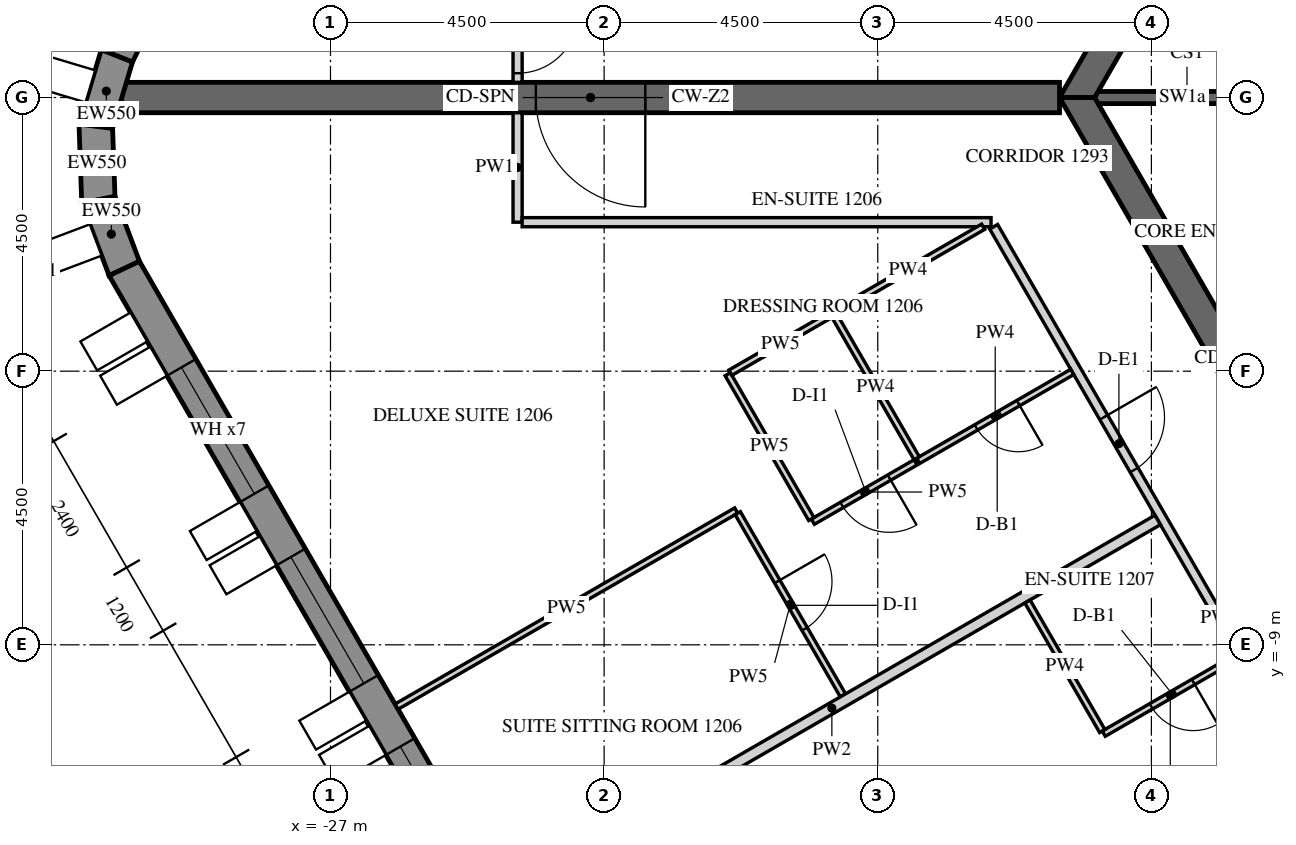
"""IFC4 building model, lengths in metres.
Left out: names, types, materials, properties, quantities, classifications, styles, units other than length and angle.
Written with IfcOpenShell. Run it as: python <this file> out.ifc"""

import sys

from ifc_helpers import new_model, si_unit, direction, frame, frame_2d, origin, place, context, subcontext, project, spatial, polyline, rectangle, outline, extrude, element, fill, save


model = new_model("IFC4")
c1 = context("Model", 3, precision=1e-05, world=origin(), true_north=direction((0.0, 1.0)))
c2 = subcontext(c1, "Body", "Model", "MODEL_VIEW")
j1 = project(units=[si_unit("LENGTHUNIT", "METRE"), si_unit("PLANEANGLEUNIT", "RADIAN")], contexts=[c1])
p1 = place(None, origin())
s1 = spatial("IfcSite", under=j1, at=p1, CompositionType="ELEMENT")
p2 = place(p1, origin())
s2 = spatial("IfcBuilding", under=s1, at=p2, CompositionType="ELEMENT")
p3 = place(p2, frame((0.0, 0.0, 164.4)))
s3 = spatial("IfcBuildingStorey", under=s2, at=p3, CompositionType="ELEMENT", Elevation=164.4)
p4 = place(p3, frame((-18.345, 25.633, -0.15), z_axis=(0.0, 0.0, 1.0), x_axis=(-0.43837181828, -0.898793718791, 0.0)))
e1 = element("IfcWall", 1, at=p4, inside=s3, PredefinedType="SOLIDWALL", context=c2, shape_type="SweptSolid", body=[
    extrude(outline(polyline([(-0.026, -0.275), (27.78, -0.275), (27.735, 0.275), (0.026, 0.275), (-0.026, -0.275)])), origin(), (0.0, 0.0, 1.0), 3.9),
])
p5 = place(p4, frame((1.879, 0.0, 1.05)))
e2 = element("IfcOpeningElement", 2, at=p5, cuts=e1, PredefinedType="OPENING", context=c2, shape_type="SweptSolid", body=[
    extrude(rectangle(XDim=2.4, YDim=2.4, at=frame_2d((1.2, 1.2))), frame((0.0, 0.285, 0.0), z_axis=(0.0, -1.0, 0.0), x_axis=(1.0, 0.0, 0.0)), (0.0, 0.0, 1.0), 0.57),
])
p6 = place(p4, frame((5.479, 0.0, 1.05)))
e3 = element("IfcOpeningElement", 3, at=p6, cuts=e1, PredefinedType="OPENING", context=c2, shape_type="SweptSolid", body=[
    extrude(rectangle(XDim=2.4, YDim=2.4, at=frame_2d((1.2, 1.2))), frame((0.0, 0.285, 0.0), z_axis=(0.0, -1.0, 0.0), x_axis=(1.0, 0.0, 0.0)), (0.0, 0.0, 1.0), 0.57),
])
p7 = place(p4, frame((9.079, 0.0, 1.05)))
e4 = element("IfcOpeningElement", 4, at=p7, cuts=e1, PredefinedType="OPENING", context=c2, shape_type="SweptSolid", body=[
    extrude(rectangle(XDim=2.4, YDim=2.4, at=frame_2d((1.2, 1.2))), frame((0.0, 0.285, 0.0), z_axis=(0.0, -1.0, 0.0), x_axis=(1.0, 0.0, 0.0)), (0.0, 0.0, 1.0), 0.57),
])
p8 = place(p4, frame((12.679, 0.0, 1.05)))
e5 = element("IfcOpeningElement", 5, at=p8, cuts=e1, PredefinedType="OPENING", context=c2, shape_type="SweptSolid", body=[
    extrude(rectangle(XDim=2.4, YDim=2.4, at=frame_2d((1.2, 1.2))), frame((0.0, 0.285, 0.0), z_axis=(0.0, -1.0, 0.0), x_axis=(1.0, 0.0, 0.0)), (0.0, 0.0, 1.0), 0.57),
])
p9 = place(p4, frame((16.279, 0.0, 1.05)))
e6 = element("IfcOpeningElement", 6, at=p9, cuts=e1, PredefinedType="OPENING", context=c2, shape_type="SweptSolid", body=[
    extrude(rectangle(XDim=2.4, YDim=2.4, at=frame_2d((1.2, 1.2))), frame((0.0, 0.285, 0.0), z_axis=(0.0, -1.0, 0.0), x_axis=(1.0, 0.0, 0.0)), (0.0, 0.0, 1.0), 0.57),
])
p10 = place(p4, frame((19.879, 0.0, 1.05)))
e7 = element("IfcOpeningElement", 7, at=p10, cuts=e1, PredefinedType="OPENING", context=c2, shape_type="SweptSolid", body=[
    extrude(rectangle(XDim=2.4, YDim=2.4, at=frame_2d((1.2, 1.2))), frame((0.0, 0.285, 0.0), z_axis=(0.0, -1.0, 0.0), x_axis=(1.0, 0.0, 0.0)), (0.0, 0.0, 1.0), 0.57),
])
p11 = place(p4, frame((23.479, 0.0, 1.05)))
e8 = element("IfcOpeningElement", 8, at=p11, cuts=e1, PredefinedType="OPENING", context=c2, shape_type="SweptSolid", body=[
    extrude(rectangle(XDim=2.4, YDim=2.4, at=frame_2d((1.2, 1.2))), frame((0.0, 0.285, 0.0), z_axis=(0.0, -1.0, 0.0), x_axis=(1.0, 0.0, 0.0)), (0.0, 0.0, 1.0), 0.57),
])
p12 = place(p3, frame((-30.513, 0.684, -0.15), z_axis=(0.0, 0.0, 1.0), x_axis=(-0.286736058109, -0.958009620505, 0.0)))
e9 = element("IfcWall", 9, at=p12, inside=s3, PredefinedType="SOLIDWALL", context=c2, shape_type="SweptSolid", body=[
    extrude(outline(polyline([(-0.022, -0.275), (1.253, -0.275), (1.163, 0.275), (0.022, 0.275), (-0.022, -0.275)])), origin(), (0.0, 0.0, 1.0), 3.9),
])
p13 = place(p3, frame((-30.86, -0.473, -0.15), z_axis=(0.0, 0.0, 1.0), x_axis=(0.03495638276, -0.999388838893, 0.0)))
e10 = element("IfcWall", 10, at=p13, inside=s3, PredefinedType="SOLIDWALL", context=c2, shape_type="SweptSolid", body=[
    extrude(outline(polyline([(-0.045, -0.275), (1.253, -0.275), (1.163, 0.275), (0.045, 0.275), (-0.045, -0.275)])), origin(), (0.0, 0.0, 1.0), 3.9),
])
p14 = place(p3, frame((-30.817, -1.681, -0.15), z_axis=(0.0, 0.0, 1.0), x_axis=(0.352850303963, -0.935679786569, 0.0)))
e11 = element("IfcWall", 11, at=p14, inside=s3, PredefinedType="SOLIDWALL", context=c2, shape_type="SweptSolid", body=[
    extrude(outline(polyline([(-0.045, -0.275), (1.23, -0.275), (1.186, 0.275), (0.045, 0.275), (-0.045, -0.275)])), origin(), (0.0, 0.0, 1.0), 3.9),
])
p15 = place(p3, frame((-30.391, -2.811, -0.15), z_axis=(0.0, 0.0, 1.0), x_axis=(0.499998569178, -0.866026229868, 0.0)))
e12 = element("IfcWall", 12, at=p15, inside=s3, PredefinedType="SOLIDWALL", context=c2, shape_type="SweptSolid", body=[
    extrude(outline(polyline([(-0.022, -0.275), (27.783, -0.275), (27.732, 0.275), (0.022, 0.275), (-0.022, -0.275)])), origin(), (0.0, 0.0, 1.0), 3.9),
])
p16 = place(p15, frame((1.879, 0.0, 1.05)))
e13 = element("IfcOpeningElement", 13, at=p16, cuts=e12, PredefinedType="OPENING", context=c2, shape_type="SweptSolid", body=[
    extrude(rectangle(XDim=2.4, YDim=2.4, at=frame_2d((1.2, 1.2))), frame((0.0, 0.285, 0.0), z_axis=(0.0, -1.0, 0.0), x_axis=(1.0, 0.0, 0.0)), (0.0, 0.0, 1.0), 0.57),
])
p17 = place(p15, frame((5.479, 0.0, 1.05)))
e14 = element("IfcOpeningElement", 14, at=p17, cuts=e12, PredefinedType="OPENING", context=c2, shape_type="SweptSolid", body=[
    extrude(rectangle(XDim=2.4, YDim=2.4, at=frame_2d((1.2, 1.2))), frame((0.0, 0.285, 0.0), z_axis=(0.0, -1.0, 0.0), x_axis=(1.0, 0.0, 0.0)), (0.0, 0.0, 1.0), 0.57),
])
p18 = place(p15, frame((9.079, 0.0, 1.05)))
e15 = element("IfcOpeningElement", 15, at=p18, cuts=e12, PredefinedType="OPENING", context=c2, shape_type="SweptSolid", body=[
    extrude(rectangle(XDim=2.4, YDim=2.4, at=frame_2d((1.2, 1.2))), frame((0.0, 0.285, 0.0), z_axis=(0.0, -1.0, 0.0), x_axis=(1.0, 0.0, 0.0)), (0.0, 0.0, 1.0), 0.57),
])
p19 = place(p15, frame((12.679, 0.0, 1.05)))
e16 = element("IfcOpeningElement", 16, at=p19, cuts=e12, PredefinedType="OPENING", context=c2, shape_type="SweptSolid", body=[
    extrude(rectangle(XDim=2.4, YDim=2.4, at=frame_2d((1.2, 1.2))), frame((0.0, 0.285, 0.0), z_axis=(0.0, -1.0, 0.0), x_axis=(1.0, 0.0, 0.0)), (0.0, 0.0, 1.0), 0.57),
])
p20 = place(p15, frame((16.279, 0.0, 1.05)))
e17 = element("IfcOpeningElement", 17, at=p20, cuts=e12, PredefinedType="OPENING", context=c2, shape_type="SweptSolid", body=[
    extrude(rectangle(XDim=2.4, YDim=2.4, at=frame_2d((1.2, 1.2))), frame((0.0, 0.285, 0.0), z_axis=(0.0, -1.0, 0.0), x_axis=(1.0, 0.0, 0.0)), (0.0, 0.0, 1.0), 0.57),
])
p21 = place(p15, frame((19.879, 0.0, 1.05)))
e18 = element("IfcOpeningElement", 18, at=p21, cuts=e12, PredefinedType="OPENING", context=c2, shape_type="SweptSolid", body=[
    extrude(rectangle(XDim=2.4, YDim=2.4, at=frame_2d((1.2, 1.2))), frame((0.0, 0.285, 0.0), z_axis=(0.0, -1.0, 0.0), x_axis=(1.0, 0.0, 0.0)), (0.0, 0.0, 1.0), 0.57),
])
p22 = place(p15, frame((23.479, 0.0, 1.05)))
e19 = element("IfcOpeningElement", 19, at=p22, cuts=e12, PredefinedType="OPENING", context=c2, shape_type="SweptSolid", body=[
    extrude(rectangle(XDim=2.4, YDim=2.4, at=frame_2d((1.2, 1.2))), frame((0.0, 0.285, 0.0), z_axis=(0.0, -1.0, 0.0), x_axis=(1.0, 0.0, 0.0)), (0.0, 0.0, 1.0), 0.57),
])
p23 = place(p3, frame((-7.361, 12.75, -0.15), z_axis=(0.0, 0.0, 1.0), x_axis=(-0.50000571537, -0.866022103989, 0.0)))
e20 = element("IfcWall", 20, at=p23, inside=s3, PredefinedType="SHEAR", context=c2, shape_type="SweptSolid", body=[
    extrude(outline(polyline([(-0.144, -0.25), (14.867, -0.25), (14.578, 0.25), (0.144, 0.25), (-0.144, -0.25)])), origin(), (0.0, 0.0, 1.0), 3.9),
])
p24 = place(p23, frame((6.49, 0.0, 0.15)))
e21 = element("IfcOpeningElement", 21, at=p24, cuts=e20, PredefinedType="OPENING", context=c2, shape_type="SweptSolid", body=[
    extrude(rectangle(XDim=1.8, YDim=2.4, at=frame_2d((0.9, 1.2))), frame((0.0, 0.26, 0.0), z_axis=(0.0, -1.0, 0.0), x_axis=(1.0, 0.0, 0.0)), (0.0, 0.0, 1.0), 0.52),
])
p25 = place(p3, frame((-14.722, 0.0, -0.15), z_axis=(0.0, 0.0, 1.0), x_axis=(0.50000571537, -0.866022103989, 0.0)))
e22 = element("IfcWall", 22, at=p25, inside=s3, PredefinedType="SHEAR", context=c2, shape_type="SweptSolid", body=[
    extrude(outline(polyline([(-0.144, -0.25), (14.867, -0.25), (14.578, 0.25), (0.144, 0.25), (-0.144, -0.25)])), origin(), (0.0, 0.0, 1.0), 3.9),
])
p26 = place(p25, frame((6.432, 0.0, 0.15)))
e23 = element("IfcOpeningElement", 23, at=p26, cuts=e22, PredefinedType="OPENING", context=c2, shape_type="SweptSolid", body=[
    extrude(rectangle(XDim=1.8, YDim=2.4, at=frame_2d((0.9, 1.2))), frame((0.0, 0.26, 0.0), z_axis=(0.0, -1.0, 0.0), x_axis=(1.0, 0.0, 0.0)), (0.0, 0.0, 1.0), 0.52),
])
p27 = place(p3, frame((-15.011, 0.0, -0.15), z_axis=(0.0, 0.0, 1.0), x_axis=(-1.0, 0.0, 0.0)))
e24 = element("IfcWall", 24, at=p27, inside=s3, PredefinedType="SHEAR", context=c2, shape_type="SweptSolid", body=[
    extrude(rectangle(XDim=15.424, YDim=0.5, at=frame_2d((7.712, 0.0))), origin(), (0.0, 0.0, 1.0), 3.9),
])
p28 = place(p27, frame((6.812, 0.0, 0.15)))
e25 = element("IfcOpeningElement", 25, at=p28, cuts=e24, PredefinedType="OPENING", context=c2, shape_type="SweptSolid", body=[
    extrude(rectangle(XDim=1.8, YDim=2.4, at=frame_2d((0.9, 1.2))), frame((0.0, 0.26, 0.0), z_axis=(0.0, -1.0, 0.0), x_axis=(1.0, 0.0, 0.0)), (0.0, 0.0, 1.0), 0.52),
])
p29 = place(p3, frame((-11.547, 0.0, -0.15), z_axis=(0.0, 0.0, 1.0), x_axis=(-1.0, 0.0, 0.0)))
e26 = element("IfcWall", 26, at=p29, inside=s3, PredefinedType="SHEAR", context=c2, shape_type="SweptSolid", body=[
    extrude(rectangle(XDim=2.887, YDim=0.2, at=frame_2d((1.443, 0.0))), origin(), (0.0, 0.0, 1.0), 3.9),
])
p30 = place(p3, frame((-23.923, 1.975, 0.0), z_axis=(0.0, 0.0, 1.0), x_axis=(0.0, -1.0, 0.0)))
e27 = element("IfcWall", 27, at=p30, inside=s3, PredefinedType="PARTITIONING", context=c2, shape_type="SweptSolid", body=[
    extrude(rectangle(XDim=1.725, YDim=0.15, at=frame_2d((0.863, 0.0))), origin(), (0.0, 0.0, 1.0), 2.988),
])
p31 = place(p30, frame((0.575, 0.0, 0.0)))
e28 = element("IfcOpeningElement", 28, at=p31, cuts=e27, PredefinedType="OPENING", context=c2, shape_type="SweptSolid", body=[
    extrude(rectangle(XDim=1.0, YDim=2.1, at=frame_2d((0.5, 1.05))), frame((0.0, 0.085, 0.0), z_axis=(0.0, -1.0, 0.0), x_axis=(1.0, 0.0, 0.0)), (0.0, 0.0, 1.0), 0.17),
])
p32 = place(p3, frame((-23.923, -0.25, 0.0), z_axis=(0.0, 0.0, 1.0), x_axis=(0.0, -1.0, 0.0)))
e29 = element("IfcWall", 29, at=p32, inside=s3, PredefinedType="PARTITIONING", context=c2, shape_type="SweptSolid", body=[
    extrude(rectangle(XDim=1.8, YDim=0.15, at=frame_2d((0.9, 0.0))), origin(), (0.0, 0.0, 1.0), 2.988),
])
p33 = place(p3, frame((-23.848, -2.05, 0.0), z_axis=(0.0, 0.0, 1.0), x_axis=(1.0, 0.0, 0.0)))
e30 = element("IfcWall", 30, at=p33, inside=s3, PredefinedType="PARTITIONING", context=c2, shape_type="SweptSolid", body=[
    extrude(rectangle(XDim=7.711, YDim=0.15, at=frame_2d((3.855, 0.0))), origin(), (0.0, 0.0, 1.0), 2.988),
])
p34 = place(p3, frame((-16.094, -2.125, 0.0), z_axis=(0.0, 0.0, 1.0), x_axis=(0.500010545262, -0.866019315389, 0.0)))
e31 = element("IfcWall", 31, at=p34, inside=s3, PredefinedType="PARTITIONING", context=c2, shape_type="SweptSolid", body=[
    extrude(rectangle(XDim=14.867, YDim=0.15, at=frame_2d((7.434, 0.0))), origin(), (0.0, 0.0, 1.0), 2.988),
])
p35 = place(p34, frame((3.619, 0.0, 0.0)))
e32 = element("IfcOpeningElement", 32, at=p35, cuts=e31, PredefinedType="OPENING", context=c2, shape_type="SweptSolid", body=[
    extrude(rectangle(XDim=1.0, YDim=2.1, at=frame_2d((0.5, 1.05))), frame((0.0, 0.085, 0.0), z_axis=(0.0, -1.0, 0.0), x_axis=(1.0, 0.0, 0.0)), (0.0, 0.0, 1.0), 0.17),
])
p36 = place(p34, frame((9.924, 0.0, 0.0)))
e33 = element("IfcOpeningElement", 33, at=p36, cuts=e31, PredefinedType="OPENING", context=c2, shape_type="SweptSolid", body=[
    extrude(rectangle(XDim=1.0, YDim=2.1, at=frame_2d((0.5, 1.05))), frame((0.0, 0.085, 0.0), z_axis=(0.0, -1.0, 0.0), x_axis=(1.0, 0.0, 0.0)), (0.0, 0.0, 1.0), 0.17),
])
p37 = place(p34, frame((13.717, 0.0, 0.0)))
e34 = element("IfcOpeningElement", 34, at=p37, cuts=e31, PredefinedType="OPENING", context=c2, shape_type="SweptSolid", body=[
    extrude(rectangle(XDim=1.0, YDim=2.1, at=frame_2d((0.5, 1.05))), frame((0.0, 0.085, 0.0), z_axis=(0.0, -1.0, 0.0), x_axis=(1.0, 0.0, 0.0)), (0.0, 0.0, 1.0), 0.17),
])
p38 = place(p3, frame((-18.735, -3.55, 0.0), z_axis=(0.0, 0.0, 1.0), x_axis=(0.866025820012, 0.499999279071, 0.0)))
e35 = element("IfcWall", 35, at=p38, inside=s3, PredefinedType="PARTITIONING", context=c2, shape_type="SweptSolid", body=[
    extrude(rectangle(XDim=2.85, YDim=0.1, at=frame_2d((1.425, 0.0))), origin(), (0.0, 0.0, 1.0), 2.988),
])
p39 = place(p3, frame((-14.802, -4.512, 0.0), z_axis=(0.0, 0.0, 1.0), x_axis=(-0.866025730634, -0.499999433879, 0.0)))
e36 = element("IfcWall", 36, at=p39, inside=s3, PredefinedType="PARTITIONING", context=c2, shape_type="SweptSolid", body=[
    extrude(rectangle(XDim=2.925, YDim=0.1, at=frame_2d((1.462, 0.0))), origin(), (0.0, 0.0, 1.0), 2.988),
])
p40 = place(p39, frame((1.025, 0.0, 0.0)))
e37 = element("IfcOpeningElement", 37, at=p40, cuts=e36, PredefinedType="OPENING", context=c2, shape_type="SweptSolid", body=[
    extrude(rectangle(XDim=0.8, YDim=2.1, at=frame_2d((0.4, 1.05))), frame((0.0, 0.06, 0.0), z_axis=(0.0, -1.0, 0.0), x_axis=(1.0, 0.0, 0.0)), (0.0, 0.0, 1.0), 0.12),
])
p41 = place(p3, frame((-17.378, -6.0, 0.0), z_axis=(0.0, 0.0, 1.0), x_axis=(-0.866000020948, -0.500043961785, 0.0)))
e38 = element("IfcWall", 38, at=p41, inside=s3, PredefinedType="PARTITIONING", context=c2, shape_type="SweptSolid", body=[
    extrude(rectangle(XDim=1.95, YDim=0.1, at=frame_2d((0.975, 0.0))), origin(), (0.0, 0.0, 1.0), 2.988),
])
p42 = place(p41, frame((0.5, 0.0, 0.0)))
e39 = element("IfcOpeningElement", 39, at=p42, cuts=e38, PredefinedType="OPENING", context=c2, shape_type="SweptSolid", body=[
    extrude(rectangle(XDim=0.9, YDim=2.1, at=frame_2d((0.45, 1.05))), frame((0.0, 0.06, 0.0), z_axis=(0.0, -1.0, 0.0), x_axis=(1.0, 0.0, 0.0)), (0.0, 0.0, 1.0), 0.12),
])
p43 = place(p3, frame((-19.092, -6.932, 0.0), z_axis=(0.0, 0.0, 1.0), x_axis=(-0.499996545922, 0.866027397988, 0.0)))
e40 = element("IfcWall", 40, at=p43, inside=s3, PredefinedType="PARTITIONING", context=c2, shape_type="SweptSolid", body=[
    extrude(rectangle(XDim=2.75, YDim=0.1, at=frame_2d((1.375, 0.0))), origin(), (0.0, 0.0, 1.0), 2.988),
])
p44 = place(p3, frame((-20.424, -4.525, 0.0), z_axis=(0.0, 0.0, 1.0), x_axis=(0.866044365799, 0.499967155389, 0.0)))
e41 = element("IfcWall", 41, at=p44, inside=s3, PredefinedType="PARTITIONING", context=c2, shape_type="SweptSolid", body=[
    extrude(rectangle(XDim=1.9, YDim=0.1, at=frame_2d((0.95, 0.0))), origin(), (0.0, 0.0, 1.0), 2.988),
])
p45 = place(p3, frame((-25.914, -10.017, 0.0), z_axis=(0.0, 0.0, 1.0), x_axis=(0.866021702275, 0.500006411147, 0.0)))
e42 = element("IfcWall", 42, at=p45, inside=s3, PredefinedType="PARTITIONING", context=c2, shape_type="SweptSolid", body=[
    extrude(rectangle(XDim=6.45, YDim=0.1, at=frame_2d((3.225, 0.0))), origin(), (0.0, 0.0, 1.0), 2.988),
])
p46 = place(p3, frame((-20.302, -6.835, 0.0), z_axis=(0.0, 0.0, 1.0), x_axis=(0.500009533716, -0.866019899421, 0.0)))
e43 = element("IfcWall", 43, at=p46, inside=s3, PredefinedType="PARTITIONING", context=c2, shape_type="SweptSolid", body=[
    extrude(rectangle(XDim=3.46, YDim=0.1, at=frame_2d((1.73, 0.0))), origin(), (0.0, 0.0, 1.0), 2.988),
])
p47 = place(p46, frame((1.3, 0.0, 0.0)))
e44 = element("IfcOpeningElement", 44, at=p47, cuts=e43, PredefinedType="OPENING", context=c2, shape_type="SweptSolid", body=[
    extrude(rectangle(XDim=0.9, YDim=2.1, at=frame_2d((0.45, 1.05))), frame((0.0, 0.06, 0.0), z_axis=(0.0, -1.0, 0.0), x_axis=(1.0, 0.0, 0.0)), (0.0, 0.0, 1.0), 0.12),
])
p48 = place(p3, frame((-24.114, -13.134, 0.0), z_axis=(0.0, 0.0, 1.0), x_axis=(0.866024931941, 0.500000817256, 0.0)))
e45 = element("IfcWall", 45, at=p48, inside=s3, PredefinedType="PARTITIONING", context=c2, shape_type="SweptSolid", body=[
    extrude(rectangle(XDim=12.375, YDim=0.18, at=frame_2d((6.188, 0.0))), origin(), (0.0, 0.0, 1.0), 2.988),
])
p49 = place(p3, frame((-18.71, -3.593, 0.0), z_axis=(0.0, 0.0, 1.0), x_axis=(0.4999416173, -0.866059108428, 0.0)))
e46 = element("IfcWall", 46, at=p49, inside=s3, PredefinedType="PARTITIONING", context=c2, shape_type="SweptSolid", body=[
    extrude(rectangle(XDim=2.7, YDim=0.1, at=frame_2d((1.35, 0.0))), origin(), (0.0, 0.0, 1.0), 2.988),
])
p50 = place(p3, frame((-12.096, -9.198, 0.0), z_axis=(0.0, 0.0, 1.0), x_axis=(-0.866039067339, -0.499976333282, 0.0)))
e47 = element("IfcWall", 47, at=p50, inside=s3, PredefinedType="PARTITIONING", context=c2, shape_type="SweptSolid", body=[
    extrude(rectangle(XDim=2.525, YDim=0.1, at=frame_2d((1.262, 0.0))), origin(), (0.0, 0.0, 1.0), 2.988),
])
p51 = place(p50, frame((0.825, 0.0, 0.0)))
e48 = element("IfcOpeningElement", 48, at=p51, cuts=e47, PredefinedType="OPENING", context=c2, shape_type="SweptSolid", body=[
    extrude(rectangle(XDim=0.8, YDim=2.1, at=frame_2d((0.4, 1.05))), frame((0.0, 0.06, 0.0), z_axis=(0.0, -1.0, 0.0), x_axis=(1.0, 0.0, 0.0)), (0.0, 0.0, 1.0), 0.12),
])
p52 = place(p3, frame((-14.308, -10.418, 0.0), z_axis=(0.0, 0.0, 1.0), x_axis=(-0.499960120811, 0.86604842682, 0.0)))
e49 = element("IfcWall", 49, at=p52, inside=s3, PredefinedType="PARTITIONING", context=c2, shape_type="SweptSolid", body=[
    extrude(rectangle(XDim=2.46, YDim=0.1, at=frame_2d((1.23, 0.0))), origin(), (0.0, 0.0, 1.0), 2.988),
])
p53 = place(p16, frame((0.0, 0.205, 0.0)))
e50 = element("IfcWindow", 50, at=p53, inside=s3, PartitioningType="DOUBLE_PANEL_VERTICAL", PredefinedType="WINDOW", context=c2, shape_type="SweptSolid", body=[
    extrude(rectangle(XDim=2.4, YDim=2.4, at=frame_2d((1.2, 1.2))), frame((0.0, 0.03, 0.0), z_axis=(0.0, -1.0, 0.0), x_axis=(1.0, 0.0, 0.0)), (0.0, 0.0, 1.0), 0.06),
])
fill(e13, e50)
p54 = place(p17, frame((0.0, 0.205, 0.0)))
e51 = element("IfcWindow", 51, at=p54, inside=s3, PartitioningType="DOUBLE_PANEL_VERTICAL", PredefinedType="WINDOW", context=c2, shape_type="SweptSolid", body=[
    extrude(rectangle(XDim=2.4, YDim=2.4, at=frame_2d((1.2, 1.2))), frame((0.0, 0.03, 0.0), z_axis=(0.0, -1.0, 0.0), x_axis=(1.0, 0.0, 0.0)), (0.0, 0.0, 1.0), 0.06),
])
fill(e14, e51)
p55 = place(p18, frame((0.0, 0.205, 0.0)))
e52 = element("IfcWindow", 52, at=p55, inside=s3, PartitioningType="DOUBLE_PANEL_VERTICAL", PredefinedType="WINDOW", context=c2, shape_type="SweptSolid", body=[
    extrude(rectangle(XDim=2.4, YDim=2.4, at=frame_2d((1.2, 1.2))), frame((0.0, 0.03, 0.0), z_axis=(0.0, -1.0, 0.0), x_axis=(1.0, 0.0, 0.0)), (0.0, 0.0, 1.0), 0.06),
])
fill(e15, e52)
p56 = place(p28, origin())
e53 = element("IfcDoor", 53, at=p56, inside=s3, OperationType="DOUBLE_DOOR_SINGLE_SWING", PredefinedType="DOOR", context=c2, shape_type="SweptSolid", body=[
    extrude(rectangle(XDim=1.8, YDim=2.4, at=frame_2d((0.9, 1.2))), frame((0.0, 0.025, 0.0), z_axis=(0.0, -1.0, 0.0), x_axis=(1.0, 0.0, 0.0)), (0.0, 0.0, 1.0), 0.05),
])
fill(e25, e53)
p57 = place(p31, origin())
e54 = element("IfcDoor", 54, at=p57, inside=s3, OperationType="SINGLE_SWING_LEFT", PredefinedType="DOOR", context=c2, shape_type="SweptSolid", body=[
    extrude(rectangle(XDim=1.0, YDim=2.1, at=frame_2d((0.5, 1.05))), frame((0.0, 0.025, 0.0), z_axis=(0.0, -1.0, 0.0), x_axis=(1.0, 0.0, 0.0)), (0.0, 0.0, 1.0), 0.05),
])
fill(e28, e54)
p58 = place(p35, origin())
e55 = element("IfcDoor", 55, at=p58, inside=s3, OperationType="SINGLE_SWING_RIGHT", PredefinedType="DOOR", context=c2, shape_type="SweptSolid", body=[
    extrude(rectangle(XDim=1.0, YDim=2.1, at=frame_2d((0.5, 1.05))), frame((0.0, 0.025, 0.0), z_axis=(0.0, -1.0, 0.0), x_axis=(1.0, 0.0, 0.0)), (0.0, 0.0, 1.0), 0.05),
])
fill(e32, e55)
p59 = place(p40, origin())
e56 = element("IfcDoor", 56, at=p59, inside=s3, OperationType="SINGLE_SWING_RIGHT", PredefinedType="DOOR", context=c2, shape_type="SweptSolid", body=[
    extrude(rectangle(XDim=0.8, YDim=2.1, at=frame_2d((0.4, 1.05))), frame((0.0, 0.025, 0.0), z_axis=(0.0, -1.0, 0.0), x_axis=(1.0, 0.0, 0.0)), (0.0, 0.0, 1.0), 0.05),
])
fill(e37, e56)
p60 = place(p42, origin())
e57 = element("IfcDoor", 57, at=p60, inside=s3, OperationType="SINGLE_SWING_RIGHT", PredefinedType="DOOR", context=c2, shape_type="SweptSolid", body=[
    extrude(rectangle(XDim=0.9, YDim=2.1, at=frame_2d((0.45, 1.05))), frame((0.0, 0.025, 0.0), z_axis=(0.0, -1.0, 0.0), x_axis=(1.0, 0.0, 0.0)), (0.0, 0.0, 1.0), 0.05),
])
fill(e39, e57)
p61 = place(p47, origin())
e58 = element("IfcDoor", 58, at=p61, inside=s3, OperationType="SINGLE_SWING_RIGHT", PredefinedType="DOOR", context=c2, shape_type="SweptSolid", body=[
    extrude(rectangle(XDim=0.9, YDim=2.1, at=frame_2d((0.45, 1.05))), frame((0.0, 0.025, 0.0), z_axis=(0.0, -1.0, 0.0), x_axis=(1.0, 0.0, 0.0)), (0.0, 0.0, 1.0), 0.05),
])
fill(e44, e58)
p62 = place(p51, origin())
e59 = element("IfcDoor", 59, at=p62, inside=s3, OperationType="SINGLE_SWING_RIGHT", PredefinedType="DOOR", context=c2, shape_type="SweptSolid", body=[
    extrude(rectangle(XDim=0.8, YDim=2.1, at=frame_2d((0.4, 1.05))), frame((0.0, 0.025, 0.0), z_axis=(0.0, -1.0, 0.0), x_axis=(1.0, 0.0, 0.0)), (0.0, 0.0, 1.0), 0.05),
])
fill(e48, e59)
save(model, sys.argv[1])
